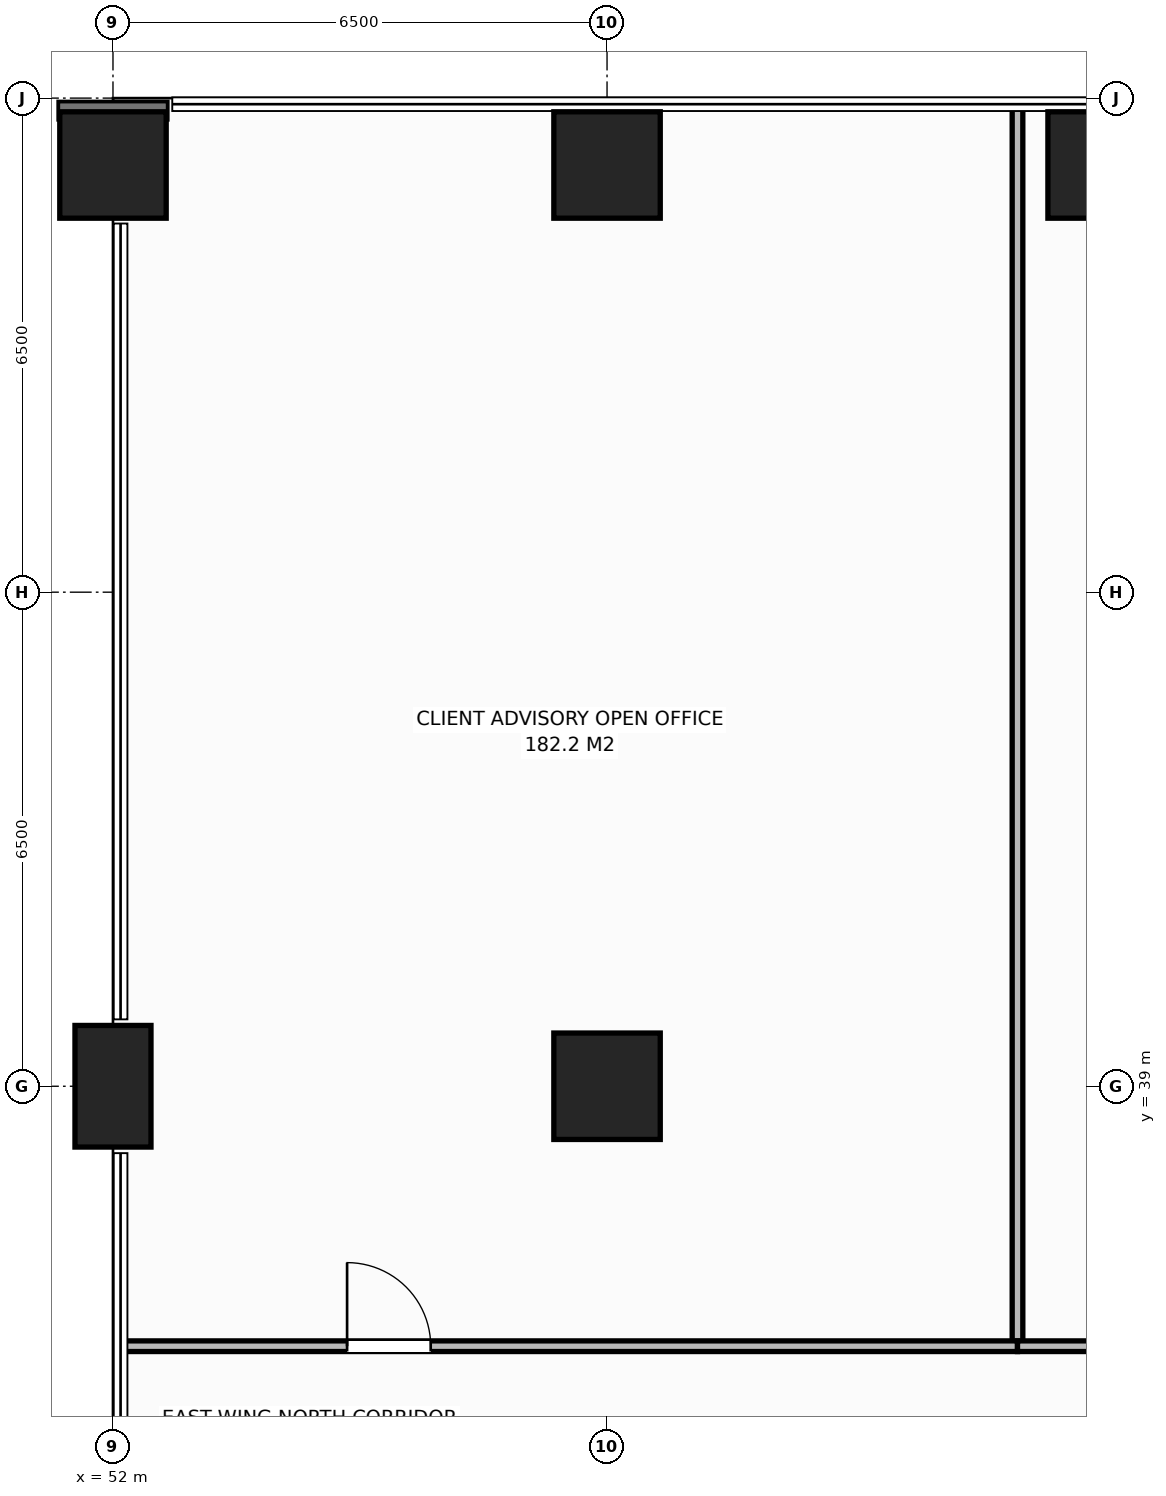
"""IFC4 building model, lengths in metres.
Left out: names, types, materials, properties, quantities, classifications, styles, units other than length and angle.
Written with IfcOpenShell. Run it as: python <this file> out.ifc"""

import sys

from ifc_helpers import new_model, si_unit, direction, frame, frame_2d, origin, origin_2d, place, context, subcontext, project, spatial, rectangle, extrude, element, fill, save


model = new_model("IFC4")
c1 = context("Model", 3, precision=1e-05, world=origin(), true_north=direction((0.0, 1.0)))
c2 = subcontext(c1, "Body", "Model", "MODEL_VIEW")
j1 = project(units=[si_unit("LENGTHUNIT", "METRE"), si_unit("PLANEANGLEUNIT", "RADIAN")], contexts=[c1])
p1 = place(None, origin())
s1 = spatial("IfcSite", under=j1, at=p1, CompositionType="ELEMENT")
p2 = place(p1, origin())
s2 = spatial("IfcBuilding", under=s1, at=p2, CompositionType="ELEMENT")
p3 = place(p2, frame((0.0, 0.0, 6.0)))
s3 = spatial("IfcBuildingStorey", under=s2, at=p3, CompositionType="ELEMENT", Elevation=6.0)
p4 = place(p3, frame((58.5, 39.0, 0.0), z_axis=(0.0, 0.0, 1.0), x_axis=(1.0, 0.0, 0.0)))
e1 = element("IfcColumn", 1, at=p4, inside=s3, PredefinedType="COLUMN", context=c2, shape_type="SweptSolid", body=[
    extrude(rectangle(XDim=1.4, YDim=1.4, at=origin_2d()), origin(), (0.0, 0.0, 1.0), 5.5),
])
p5 = place(p3, frame((52.0, 39.0, 0.0), z_axis=(0.0, 0.0, 1.0), x_axis=(1.0, 0.0, 0.0)))
e2 = element("IfcColumn", 2, at=p5, inside=s3, PredefinedType="PILASTER", context=c2, shape_type="SweptSolid", body=[
    extrude(rectangle(XDim=1.0, YDim=1.6, at=origin_2d()), origin(), (0.0, 0.0, 1.0), 5.5),
])
for number, where, z_axis, x_axis in (
    (3, (52.0, 51.12, 0.0), (0.0, 0.0, 1.0), (1.0, 0.0, 0.0)),
    (4, (58.5, 51.12, 0.0), (0.0, 0.0, 1.0), (1.0, 0.0, 0.0)),
    (5, (65.0, 51.12, 0.0), (0.0, 0.0, 1.0), (1.0, 0.0, 0.0)),
):
    element("IfcColumn", number, at=place(p3, frame(where, z_axis=z_axis, x_axis=x_axis)), inside=s3, PredefinedType="COLUMN", context=c2, shape_type="SweptSolid", body=[
        extrude(rectangle(XDim=1.4, YDim=1.4, at=origin_2d()), origin(), (0.0, 0.0, 1.0), 5.5),
    ])
p6 = place(p3, frame((63.9, 35.58, 0.0), z_axis=(0.0, 0.0, 1.0), x_axis=(0.0, 1.0, 0.0)))
e6 = element("IfcWall", 6, at=p6, inside=s3, PredefinedType="PARTITIONING", context=c2, shape_type="SweptSolid", body=[
    extrude(rectangle(XDim=16.36, YDim=0.14, at=frame_2d((8.18, 0.0))), origin(), (0.0, 0.0, 1.0), 5.22),
])
p7 = place(p3, frame((52.08, 35.58, 0.0), z_axis=(0.0, 0.0, 1.0), x_axis=(1.0, 0.0, 0.0)))
e7 = element("IfcWall", 7, at=p7, inside=s3, PredefinedType="PARTITIONING", context=c2, shape_type="SweptSolid", body=[
    extrude(rectangle(XDim=11.82, YDim=0.14, at=frame_2d((5.91, 0.0))), origin(), (0.0, 0.0, 1.0), 5.22),
])
p8 = place(p7, frame((3.0, 0.0, 0.0)))
e8 = element("IfcOpeningElement", 8, at=p8, cuts=e7, PredefinedType="OPENING", context=c2, shape_type="SweptSolid", body=[
    extrude(rectangle(XDim=1.1, YDim=2.15, at=frame_2d((0.55, 1.075))), frame((0.0, 0.08, 0.0), z_axis=(0.0, -1.0, 0.0), x_axis=(1.0, 0.0, 0.0)), (0.0, 0.0, 1.0), 0.16),
])
p9 = place(p3, frame((63.9, 35.58, 0.0), z_axis=(0.0, 0.0, 1.0), x_axis=(1.0, 0.0, 0.0)))
e9 = element("IfcWall", 9, at=p9, inside=s3, PredefinedType="PARTITIONING", context=c2, shape_type="SweptSolid", body=[
    extrude(rectangle(XDim=3.78, YDim=0.14, at=frame_2d((1.89, 0.0))), origin(), (0.0, 0.0, 1.0), 5.22),
])
p10 = place(p9, frame((1.2, 0.0, 0.0)))
e10 = element("IfcOpeningElement", 10, at=p10, cuts=e9, PredefinedType="OPENING", context=c2, shape_type="SweptSolid", body=[
    extrude(rectangle(XDim=0.95, YDim=2.15, at=frame_2d((0.475, 1.075))), frame((0.0, 0.08, 0.0), z_axis=(0.0, -1.0, 0.0), x_axis=(1.0, 0.0, 0.0)), (0.0, 0.0, 1.0), 0.16),
])
p11 = place(p8, origin())
e11 = element("IfcDoor", 11, at=p11, inside=s3, OperationType="SINGLE_SWING_LEFT", PredefinedType="DOOR", context=c2, shape_type="SweptSolid", body=[
    extrude(rectangle(XDim=1.1, YDim=2.15, at=frame_2d((0.55, 1.075))), frame((0.0, 0.025, 0.0), z_axis=(0.0, -1.0, 0.0), x_axis=(1.0, 0.0, 0.0)), (0.0, 0.0, 1.0), 0.05),
])
fill(e8, e11)
save(model, sys.argv[1])
